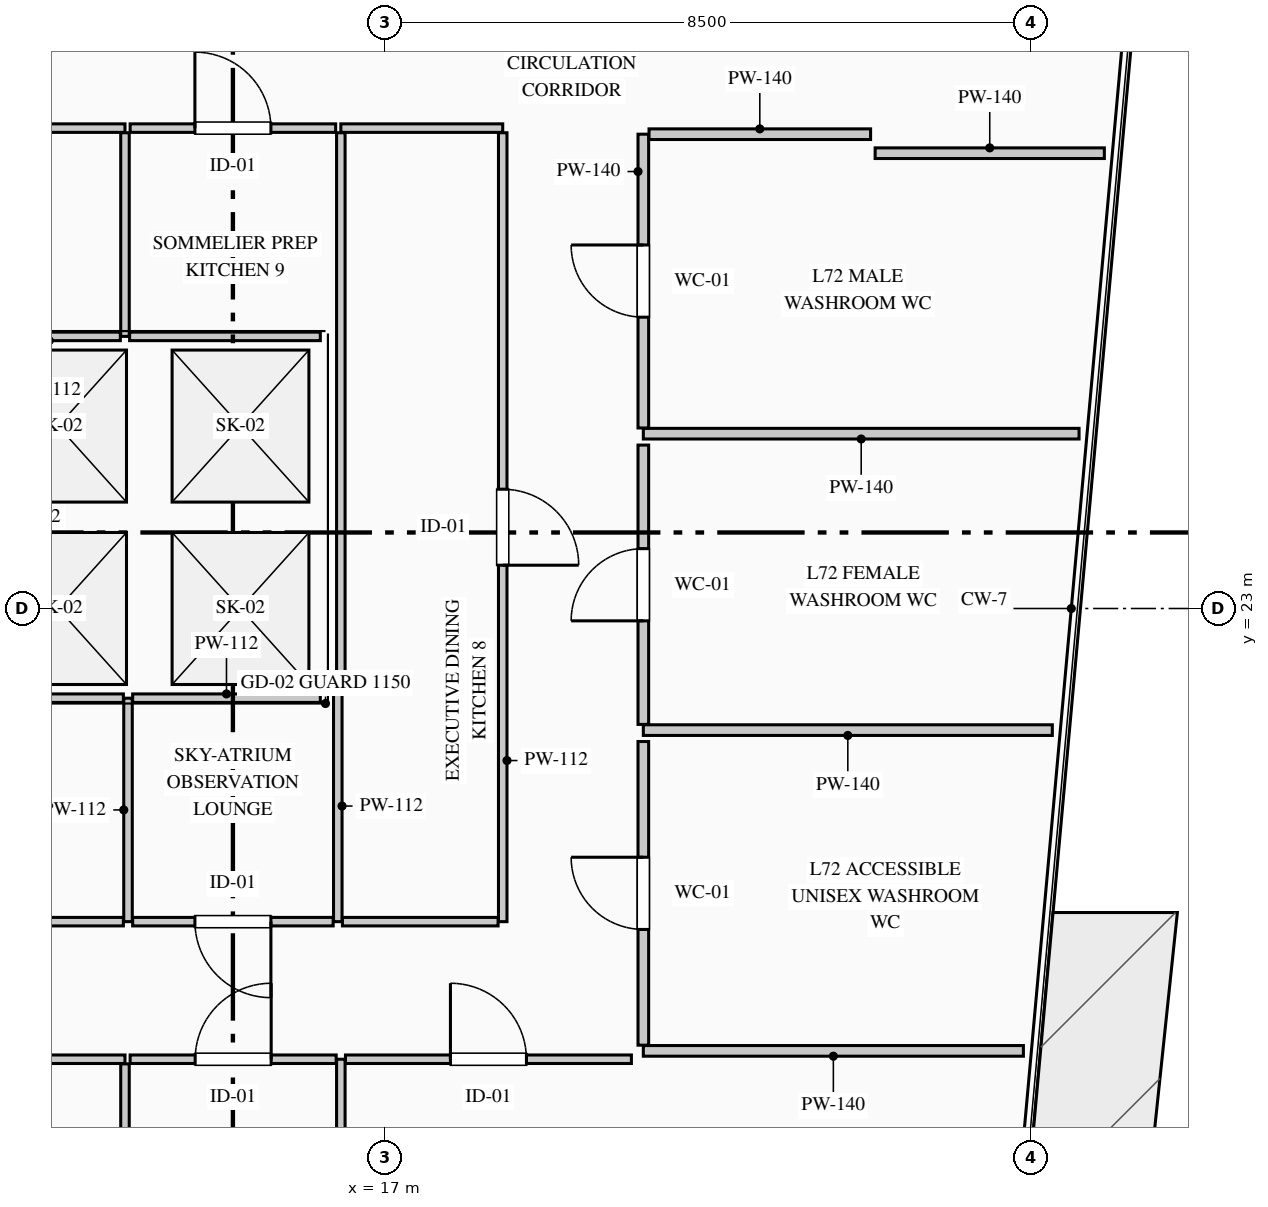
"""IFC4 building model, lengths in metres.
Left out: names, types, materials, properties, quantities, classifications, styles, units other than length and angle.
Written with IfcOpenShell. Run it as: python <this file> out.ifc"""

import sys

from ifc_helpers import new_model, si_unit, direction, frame, frame_2d, origin, origin_2d, place, context, subcontext, project, spatial, rectangle, extrude, element, fill, save


model = new_model("IFC4")
c1 = context("Model", 3, precision=1e-05, world=origin(), true_north=direction((0.0, 1.0)))
c2 = subcontext(c1, "Body", "Model", "MODEL_VIEW")
j1 = project(units=[si_unit("LENGTHUNIT", "METRE"), si_unit("PLANEANGLEUNIT", "RADIAN")], contexts=[c1])
p1 = place(None, origin())
s1 = spatial("IfcSite", under=j1, at=p1, CompositionType="ELEMENT")
p2 = place(p1, origin())
s2 = spatial("IfcBuilding", under=s1, at=p2, CompositionType="ELEMENT")
p3 = place(p2, frame((0.0, 0.0, 300.15)))
s3 = spatial("IfcBuildingStorey", under=s2, at=p3, CompositionType="ELEMENT", Elevation=300.15)
p4 = place(p3, frame((23.45, 28.99, 0.0), z_axis=(0.0, 0.0, 1.0), x_axis=(1.0, 0.0, 0.0)))
e1 = element("IfcWall", 1, at=p4, inside=s3, PredefinedType="PARTITIONING", context=c2, shape_type="SweptSolid", body=[
    extrude(rectangle(XDim=3.016, YDim=0.14, at=frame_2d((1.508, 0.0))), origin(), (0.0, 0.0, 1.0), 3.7),
])
p5 = place(p3, frame((26.133, 25.3, 0.0), z_axis=(0.0, 0.0, 1.0), x_axis=(-1.0, 0.0, 0.0)))
e2 = element("IfcWall", 2, at=p5, inside=s3, PredefinedType="PARTITIONING", context=c2, shape_type="SweptSolid", body=[
    extrude(rectangle(XDim=5.733, YDim=0.14, at=frame_2d((2.866, 0.0))), origin(), (0.0, 0.0, 1.0), 3.7),
])
p6 = place(p3, frame((20.4, 25.375, 0.0), z_axis=(0.0, 0.0, 1.0), x_axis=(0.0, 1.0, 0.0)))
e3 = element("IfcWall", 3, at=p6, inside=s3, PredefinedType="PARTITIONING", context=c2, shape_type="SweptSolid", body=[
    extrude(rectangle(XDim=3.865, YDim=0.14, at=frame_2d((1.933, 0.0))), origin(), (0.0, 0.0, 1.0), 3.7),
])
p7 = place(p6, frame((1.458, 0.0, 0.0)))
e4 = element("IfcOpeningElement", 4, at=p7, cuts=e3, PredefinedType="OPENING", context=c2, shape_type="SweptSolid", body=[
    extrude(rectangle(XDim=0.95, YDim=2.15, at=frame_2d((0.475, 1.075))), frame((0.0, 0.08, 0.0), z_axis=(0.0, -1.0, 0.0), x_axis=(1.0, 0.0, 0.0)), (0.0, 0.0, 1.0), 0.16),
])
p8 = place(p3, frame((20.475, 29.24, 0.0), z_axis=(0.0, 0.0, 1.0), x_axis=(1.0, 0.0, 0.0)))
e5 = element("IfcWall", 5, at=p8, inside=s3, PredefinedType="PARTITIONING", context=c2, shape_type="SweptSolid", body=[
    extrude(rectangle(XDim=2.915, YDim=0.14, at=frame_2d((1.458, 0.0))), origin(), (0.0, 0.0, 1.0), 3.7),
])
p9 = place(p3, frame((25.781, 21.4, 0.0), z_axis=(0.0, 0.0, 1.0), x_axis=(-1.0, 0.0, 0.0)))
e6 = element("IfcWall", 6, at=p9, inside=s3, PredefinedType="PARTITIONING", context=c2, shape_type="SweptSolid", body=[
    extrude(rectangle(XDim=5.381, YDim=0.14, at=frame_2d((2.69, 0.0))), origin(), (0.0, 0.0, 1.0), 3.7),
])
p10 = place(p3, frame((20.4, 21.475, 0.0), z_axis=(0.0, 0.0, 1.0), x_axis=(0.0, 1.0, 0.0)))
e7 = element("IfcWall", 7, at=p10, inside=s3, PredefinedType="PARTITIONING", context=c2, shape_type="SweptSolid", body=[
    extrude(rectangle(XDim=3.675, YDim=0.14, at=frame_2d((1.837, 0.0))), origin(), (0.0, 0.0, 1.0), 3.7),
])
p11 = place(p10, frame((1.363, 0.0, 0.0)))
e8 = element("IfcOpeningElement", 8, at=p11, cuts=e7, PredefinedType="OPENING", context=c2, shape_type="SweptSolid", body=[
    extrude(rectangle(XDim=0.95, YDim=2.15, at=frame_2d((0.475, 1.075))), frame((0.0, 0.08, 0.0), z_axis=(0.0, -1.0, 0.0), x_axis=(1.0, 0.0, 0.0)), (0.0, 0.0, 1.0), 0.16),
])
p12 = place(p3, frame((25.4, 17.18, 0.0), z_axis=(0.0, 0.0, 1.0), x_axis=(-1.0, 0.0, 0.0)))
e9 = element("IfcWall", 9, at=p12, inside=s3, PredefinedType="PARTITIONING", context=c2, shape_type="SweptSolid", body=[
    extrude(rectangle(XDim=5.0, YDim=0.14, at=frame_2d((2.5, 0.0))), origin(), (0.0, 0.0, 1.0), 3.7),
])
p13 = place(p3, frame((20.4, 17.255, 0.0), z_axis=(0.0, 0.0, 1.0), x_axis=(0.0, 1.0, 0.0)))
e10 = element("IfcWall", 10, at=p13, inside=s3, PredefinedType="PARTITIONING", context=c2, shape_type="SweptSolid", body=[
    extrude(rectangle(XDim=3.995, YDim=0.14, at=frame_2d((1.998, 0.0))), origin(), (0.0, 0.0, 1.0), 3.7),
])
p14 = place(p13, frame((1.522, 0.0, 0.0)))
e11 = element("IfcOpeningElement", 11, at=p14, cuts=e10, PredefinedType="OPENING", context=c2, shape_type="SweptSolid", body=[
    extrude(rectangle(XDim=0.95, YDim=2.15, at=frame_2d((0.475, 1.075))), frame((0.0, 0.08, 0.0), z_axis=(0.0, -1.0, 0.0), x_axis=(1.0, 0.0, 0.0)), (0.0, 0.0, 1.0), 0.16),
])
p15 = place(p3, frame((10.281, 17.07, 0.0), z_axis=(0.0, 0.0, 1.0), x_axis=(1.0, 0.0, 0.0)))
e12 = element("IfcWall", 12, at=p15, inside=s3, PredefinedType="PARTITIONING", context=c2, shape_type="SweptSolid", body=[
    extrude(rectangle(XDim=3.299, YDim=0.112, at=frame_2d((1.649, 0.0))), origin(), (0.0, 0.0, 1.0), 3.7),
])
p16 = place(p15, frame((1.149, 0.0, 0.0)))
e13 = element("IfcOpeningElement", 13, at=p16, cuts=e12, PredefinedType="OPENING", context=c2, shape_type="SweptSolid", body=[
    extrude(rectangle(XDim=1.0, YDim=2.15, at=frame_2d((0.5, 1.075))), frame((0.0, 0.066, 0.0), z_axis=(0.0, -1.0, 0.0), x_axis=(1.0, 0.0, 0.0)), (0.0, 0.0, 1.0), 0.132),
])
p17 = place(p3, frame((13.58, 17.009, 0.0), z_axis=(0.0, 0.0, 1.0), x_axis=(0.0, -1.0, 0.0)))
e14 = element("IfcWall", 14, at=p17, inside=s3, PredefinedType="PARTITIONING", context=c2, shape_type="SweptSolid", body=[
    extrude(rectangle(XDim=11.766, YDim=0.112, at=frame_2d((5.883, 0.0))), origin(), (0.0, 0.0, 1.0), 3.7),
])
p18 = place(p3, frame((16.42, 10.125, 0.0), z_axis=(0.0, 0.0, 1.0), x_axis=(0.0, 1.0, 0.0)))
e15 = element("IfcWall", 15, at=p18, inside=s3, PredefinedType="PARTITIONING", context=c2, shape_type="SweptSolid", body=[
    extrude(rectangle(XDim=6.945, YDim=0.112, at=frame_2d((3.473, 0.0))), origin(), (0.0, 0.0, 1.0), 3.7),
])
p19 = place(p3, frame((16.481, 17.07, 0.0), z_axis=(0.0, 0.0, 1.0), x_axis=(1.0, 0.0, 0.0)))
e16 = element("IfcWall", 16, at=p19, inside=s3, PredefinedType="PARTITIONING", context=c2, shape_type="SweptSolid", body=[
    extrude(rectangle(XDim=3.762, YDim=0.112, at=frame_2d((1.881, 0.0))), origin(), (0.0, 0.0, 1.0), 3.7),
])
p20 = place(p19, frame((1.381, 0.0, 0.0)))
e17 = element("IfcOpeningElement", 17, at=p20, cuts=e16, PredefinedType="OPENING", context=c2, shape_type="SweptSolid", body=[
    extrude(rectangle(XDim=1.0, YDim=2.15, at=frame_2d((0.5, 1.075))), frame((0.0, 0.066, 0.0), z_axis=(0.0, -1.0, 0.0), x_axis=(1.0, 0.0, 0.0)), (0.0, 0.0, 1.0), 0.132),
])
p21 = place(p3, frame((13.648, 17.07, 0.0), z_axis=(0.0, 0.0, 1.0), x_axis=(1.0, 0.0, 0.0)))
e18 = element("IfcWall", 18, at=p21, inside=s3, PredefinedType="PARTITIONING", context=c2, shape_type="SweptSolid", body=[
    extrude(rectangle(XDim=2.711, YDim=0.112, at=frame_2d((1.355, 0.0))), origin(), (0.0, 0.0, 1.0), 3.7),
])
p22 = place(p21, frame((0.855, 0.0, 0.0)))
e19 = element("IfcOpeningElement", 19, at=p22, cuts=e18, PredefinedType="OPENING", context=c2, shape_type="SweptSolid", body=[
    extrude(rectangle(XDim=1.0, YDim=2.15, at=frame_2d((0.5, 1.075))), frame((0.0, 0.066, 0.0), z_axis=(0.0, -1.0, 0.0), x_axis=(1.0, 0.0, 0.0)), (0.0, 0.0, 1.0), 0.132),
])
p23 = place(p3, frame((13.62, 18.88, 0.0), z_axis=(0.0, 0.0, 1.0), x_axis=(0.0, 1.0, 0.0)))
e20 = element("IfcWall", 20, at=p23, inside=s3, PredefinedType="PARTITIONING", context=c2, shape_type="SweptSolid", body=[
    extrude(rectangle(XDim=2.94, YDim=0.112, at=frame_2d((1.47, 0.0))), origin(), (0.0, 0.0, 1.0), 3.7),
])
p24 = place(p3, frame((13.681, 21.82, 0.0), z_axis=(0.0, 0.0, 1.0), x_axis=(1.0, 0.0, 0.0)))
e21 = element("IfcWall", 21, at=p24, inside=s3, PredefinedType="PARTITIONING", context=c2, shape_type="SweptSolid", body=[
    extrude(rectangle(XDim=2.469, YDim=0.112, at=frame_2d((1.234, 0.0))), origin(), (0.0, 0.0, 1.0), 3.7),
])
p25 = place(p3, frame((16.38, 21.922, 0.0), z_axis=(0.0, 0.0, 1.0), x_axis=(0.0, -1.0, 0.0)))
e22 = element("IfcWall", 22, at=p25, inside=s3, PredefinedType="PARTITIONING", context=c2, shape_type="SweptSolid", body=[
    extrude(rectangle(XDim=3.042, YDim=0.112, at=frame_2d((1.521, 0.0))), origin(), (0.0, 0.0, 1.0), 3.7),
])
p26 = place(p3, frame((16.319, 18.88, 0.0), z_axis=(0.0, 0.0, 1.0), x_axis=(-1.0, 0.0, 0.0)))
e23 = element("IfcWall", 23, at=p26, inside=s3, PredefinedType="PARTITIONING", context=c2, shape_type="SweptSolid", body=[
    extrude(rectangle(XDim=2.638, YDim=0.112, at=frame_2d((1.319, 0.0))), origin(), (0.0, 0.0, 1.0), 3.7),
])
p27 = place(p26, frame((0.819, 0.0, 0.0)))
e24 = element("IfcOpeningElement", 24, at=p27, cuts=e23, PredefinedType="OPENING", context=c2, shape_type="SweptSolid", body=[
    extrude(rectangle(XDim=1.0, YDim=2.15, at=frame_2d((0.5, 1.075))), frame((0.0, 0.066, 0.0), z_axis=(0.0, -1.0, 0.0), x_axis=(1.0, 0.0, 0.0)), (0.0, 0.0, 1.0), 0.132),
])
p28 = place(p3, frame((11.65, 21.82, 0.0), z_axis=(0.0, 0.0, 1.0), x_axis=(1.0, 0.0, 0.0)))
e25 = element("IfcWall", 25, at=p28, inside=s3, PredefinedType="PARTITIONING", context=c2, shape_type="SweptSolid", body=[
    extrude(rectangle(XDim=1.909, YDim=0.112, at=frame_2d((0.955, 0.0))), origin(), (0.0, 0.0, 1.0), 3.7),
])
p29 = place(p3, frame((13.559, 18.88, 0.0), z_axis=(0.0, 0.0, 1.0), x_axis=(-1.0, 0.0, 0.0)))
e26 = element("IfcWall", 26, at=p29, inside=s3, PredefinedType="PARTITIONING", context=c2, shape_type="SweptSolid", body=[
    extrude(rectangle(XDim=3.318, YDim=0.112, at=frame_2d((1.659, 0.0))), origin(), (0.0, 0.0, 1.0), 3.7),
])
p30 = place(p3, frame((10.248, 29.32, 0.0), z_axis=(0.0, 0.0, 1.0), x_axis=(1.0, 0.0, 0.0)))
e27 = element("IfcWall", 27, at=p30, inside=s3, PredefinedType="PARTITIONING", context=c2, shape_type="SweptSolid", body=[
    extrude(rectangle(XDim=3.332, YDim=0.112, at=frame_2d((1.666, 0.0))), origin(), (0.0, 0.0, 1.0), 3.7),
])
p31 = place(p30, frame((1.166, 0.0, 0.0)))
e28 = element("IfcOpeningElement", 28, at=p31, cuts=e27, PredefinedType="OPENING", context=c2, shape_type="SweptSolid", body=[
    extrude(rectangle(XDim=1.0, YDim=2.15, at=frame_2d((0.5, 1.075))), frame((0.0, 0.066, 0.0), z_axis=(0.0, -1.0, 0.0), x_axis=(1.0, 0.0, 0.0)), (0.0, 0.0, 1.0), 0.132),
])
p32 = place(p3, frame((13.58, 29.259, 0.0), z_axis=(0.0, 0.0, 1.0), x_axis=(0.0, -1.0, 0.0)))
e29 = element("IfcWall", 29, at=p32, inside=s3, PredefinedType="PARTITIONING", context=c2, shape_type="SweptSolid", body=[
    extrude(rectangle(XDim=2.679, YDim=0.112, at=frame_2d((1.339, 0.0))), origin(), (0.0, 0.0, 1.0), 3.7),
])
p33 = place(p3, frame((13.519, 26.58, 0.0), z_axis=(0.0, 0.0, 1.0), x_axis=(-1.0, 0.0, 0.0)))
e30 = element("IfcWall", 30, at=p33, inside=s3, PredefinedType="PARTITIONING", context=c2, shape_type="SweptSolid", body=[
    extrude(rectangle(XDim=1.869, YDim=0.112, at=frame_2d((0.935, 0.0))), origin(), (0.0, 0.0, 1.0), 3.7),
])
p34 = place(p3, frame((16.42, 29.32, 0.0), z_axis=(0.0, 0.0, 1.0), x_axis=(1.0, 0.0, 0.0)))
e31 = element("IfcWall", 31, at=p34, inside=s3, PredefinedType="PARTITIONING", context=c2, shape_type="SweptSolid", body=[
    extrude(rectangle(XDim=2.13, YDim=0.112, at=frame_2d((1.065, 0.0))), origin(), (0.0, 0.0, 1.0), 3.7),
])
p35 = place(p3, frame((18.55, 29.259, 0.0), z_axis=(0.0, 0.0, 1.0), x_axis=(0.0, -1.0, 0.0)))
e32 = element("IfcWall", 32, at=p35, inside=s3, PredefinedType="PARTITIONING", context=c2, shape_type="SweptSolid", body=[
    extrude(rectangle(XDim=10.379, YDim=0.112, at=frame_2d((5.189, 0.0))), origin(), (0.0, 0.0, 1.0), 3.7),
])
p36 = place(p35, frame((4.689, 0.0, 0.0)))
e33 = element("IfcOpeningElement", 33, at=p36, cuts=e32, PredefinedType="OPENING", context=c2, shape_type="SweptSolid", body=[
    extrude(rectangle(XDim=1.0, YDim=2.15, at=frame_2d((0.5, 1.075))), frame((0.0, 0.066, 0.0), z_axis=(0.0, -1.0, 0.0), x_axis=(1.0, 0.0, 0.0)), (0.0, 0.0, 1.0), 0.132),
])
p37 = place(p3, frame((18.489, 18.88, 0.0), z_axis=(0.0, 0.0, 1.0), x_axis=(-1.0, 0.0, 0.0)))
e34 = element("IfcWall", 34, at=p37, inside=s3, PredefinedType="PARTITIONING", context=c2, shape_type="SweptSolid", body=[
    extrude(rectangle(XDim=2.048, YDim=0.112, at=frame_2d((1.024, 0.0))), origin(), (0.0, 0.0, 1.0), 3.7),
])
p38 = place(p3, frame((16.42, 21.99, 0.0), z_axis=(0.0, 0.0, 1.0), x_axis=(0.0, 1.0, 0.0)))
e35 = element("IfcWall", 35, at=p38, inside=s3, PredefinedType="PARTITIONING", context=c2, shape_type="SweptSolid", body=[
    extrude(rectangle(XDim=7.269, YDim=0.112, at=frame_2d((3.635, 0.0))), origin(), (0.0, 0.0, 1.0), 3.7),
])
p39 = place(p3, frame((16.15, 26.58, 0.0), z_axis=(0.0, 0.0, 1.0), x_axis=(-1.0, 0.0, 0.0)))
e36 = element("IfcWall", 36, at=p39, inside=s3, PredefinedType="PARTITIONING", context=c2, shape_type="SweptSolid", body=[
    extrude(rectangle(XDim=2.509, YDim=0.112, at=frame_2d((1.254, 0.0))), origin(), (0.0, 0.0, 1.0), 3.7),
])
p40 = place(p3, frame((13.648, 29.32, 0.0), z_axis=(0.0, 0.0, 1.0), x_axis=(1.0, 0.0, 0.0)))
e37 = element("IfcWall", 37, at=p40, inside=s3, PredefinedType="PARTITIONING", context=c2, shape_type="SweptSolid", body=[
    extrude(rectangle(XDim=2.704, YDim=0.112, at=frame_2d((1.352, 0.0))), origin(), (0.0, 0.0, 1.0), 3.7),
])
p41 = place(p40, frame((0.852, 0.0, 0.0)))
e38 = element("IfcOpeningElement", 38, at=p41, cuts=e37, PredefinedType="OPENING", context=c2, shape_type="SweptSolid", body=[
    extrude(rectangle(XDim=1.0, YDim=2.15, at=frame_2d((0.5, 1.075))), frame((0.0, 0.066, 0.0), z_axis=(0.0, -1.0, 0.0), x_axis=(1.0, 0.0, 0.0)), (0.0, 0.0, 1.0), 0.132),
])
p42 = place(p3, frame((0.0, 0.0, -0.25)))
p43 = place(p42, frame((12.7, 23.0, 0.2)))
e39 = element("IfcWindow", 39, at=p43, inside=s3, PartitioningType="SINGLE_PANEL", PredefinedType="SKYLIGHT", context=c2, shape_type="SweptSolid", body=[
    extrude(rectangle(XDim=1.8, YDim=2.0, at=origin_2d()), origin(), (0.0, 0.0, 1.0), 0.05),
])
p44 = place(p42, frame((15.1, 23.0, 0.2)))
e40 = element("IfcWindow", 40, at=p44, inside=s3, PartitioningType="SINGLE_PANEL", PredefinedType="SKYLIGHT", context=c2, shape_type="SweptSolid", body=[
    extrude(rectangle(XDim=1.8, YDim=2.0, at=origin_2d()), origin(), (0.0, 0.0, 1.0), 0.05),
])
p45 = place(p42, frame((12.7, 25.4, 0.2)))
e41 = element("IfcWindow", 41, at=p45, inside=s3, PartitioningType="SINGLE_PANEL", PredefinedType="SKYLIGHT", context=c2, shape_type="SweptSolid", body=[
    extrude(rectangle(XDim=1.8, YDim=2.0, at=origin_2d()), origin(), (0.0, 0.0, 1.0), 0.05),
])
p46 = place(p42, frame((15.1, 25.4, 0.2)))
e42 = element("IfcWindow", 42, at=p46, inside=s3, PartitioningType="SINGLE_PANEL", PredefinedType="SKYLIGHT", context=c2, shape_type="SweptSolid", body=[
    extrude(rectangle(XDim=1.8, YDim=2.0, at=origin_2d()), origin(), (0.0, 0.0, 1.0), 0.05),
])
p47 = place(p7, origin())
e43 = element("IfcDoor", 43, at=p47, inside=s3, OperationType="SINGLE_SWING_RIGHT", PredefinedType="DOOR", context=c2, shape_type="SweptSolid", body=[
    extrude(rectangle(XDim=0.95, YDim=2.15, at=frame_2d((0.475, 1.075))), frame((0.0, 0.025, 0.0), z_axis=(0.0, -1.0, 0.0), x_axis=(1.0, 0.0, 0.0)), (0.0, 0.0, 1.0), 0.05),
])
fill(e4, e43)
p48 = place(p11, origin())
e44 = element("IfcDoor", 44, at=p48, inside=s3, OperationType="SINGLE_SWING_LEFT", PredefinedType="DOOR", context=c2, shape_type="SweptSolid", body=[
    extrude(rectangle(XDim=0.95, YDim=2.15, at=frame_2d((0.475, 1.075))), frame((0.0, 0.025, 0.0), z_axis=(0.0, -1.0, 0.0), x_axis=(1.0, 0.0, 0.0)), (0.0, 0.0, 1.0), 0.05),
])
fill(e8, e44)
p49 = place(p14, origin())
e45 = element("IfcDoor", 45, at=p49, inside=s3, OperationType="SINGLE_SWING_RIGHT", PredefinedType="DOOR", context=c2, shape_type="SweptSolid", body=[
    extrude(rectangle(XDim=0.95, YDim=2.15, at=frame_2d((0.475, 1.075))), frame((0.0, 0.025, 0.0), z_axis=(0.0, -1.0, 0.0), x_axis=(1.0, 0.0, 0.0)), (0.0, 0.0, 1.0), 0.05),
])
fill(e11, e45)
p50 = place(p20, origin())
e46 = element("IfcDoor", 46, at=p50, inside=s3, OperationType="SINGLE_SWING_LEFT", PredefinedType="DOOR", context=c2, shape_type="SweptSolid", body=[
    extrude(rectangle(XDim=1.0, YDim=2.15, at=frame_2d((0.5, 1.075))), frame((0.0, 0.025, 0.0), z_axis=(0.0, -1.0, 0.0), x_axis=(1.0, 0.0, 0.0)), (0.0, 0.0, 1.0), 0.05),
])
fill(e17, e46)
p51 = place(p22, origin())
e47 = element("IfcDoor", 47, at=p51, inside=s3, OperationType="SINGLE_SWING_RIGHT", PredefinedType="DOOR", context=c2, shape_type="SweptSolid", body=[
    extrude(rectangle(XDim=1.0, YDim=2.15, at=frame_2d((0.5, 1.075))), frame((0.0, 0.025, 0.0), z_axis=(0.0, -1.0, 0.0), x_axis=(1.0, 0.0, 0.0)), (0.0, 0.0, 1.0), 0.05),
])
fill(e19, e47)
p52 = place(p27, origin())
e48 = element("IfcDoor", 48, at=p52, inside=s3, OperationType="SINGLE_SWING_LEFT", PredefinedType="DOOR", context=c2, shape_type="SweptSolid", body=[
    extrude(rectangle(XDim=1.0, YDim=2.15, at=frame_2d((0.5, 1.075))), frame((0.0, 0.025, 0.0), z_axis=(0.0, -1.0, 0.0), x_axis=(1.0, 0.0, 0.0)), (0.0, 0.0, 1.0), 0.05),
])
fill(e24, e48)
p53 = place(p36, origin())
e49 = element("IfcDoor", 49, at=p53, inside=s3, OperationType="SINGLE_SWING_RIGHT", PredefinedType="DOOR", context=c2, shape_type="SweptSolid", body=[
    extrude(rectangle(XDim=1.0, YDim=2.15, at=frame_2d((0.5, 1.075))), frame((0.0, 0.025, 0.0), z_axis=(0.0, -1.0, 0.0), x_axis=(1.0, 0.0, 0.0)), (0.0, 0.0, 1.0), 0.05),
])
fill(e33, e49)
p54 = place(p41, origin())
e50 = element("IfcDoor", 50, at=p54, inside=s3, OperationType="SINGLE_SWING_LEFT", PredefinedType="DOOR", context=c2, shape_type="SweptSolid", body=[
    extrude(rectangle(XDim=1.0, YDim=2.15, at=frame_2d((0.5, 1.075))), frame((0.0, 0.025, 0.0), z_axis=(0.0, -1.0, 0.0), x_axis=(1.0, 0.0, 0.0)), (0.0, 0.0, 1.0), 0.05),
])
fill(e38, e50)
save(model, sys.argv[1])
